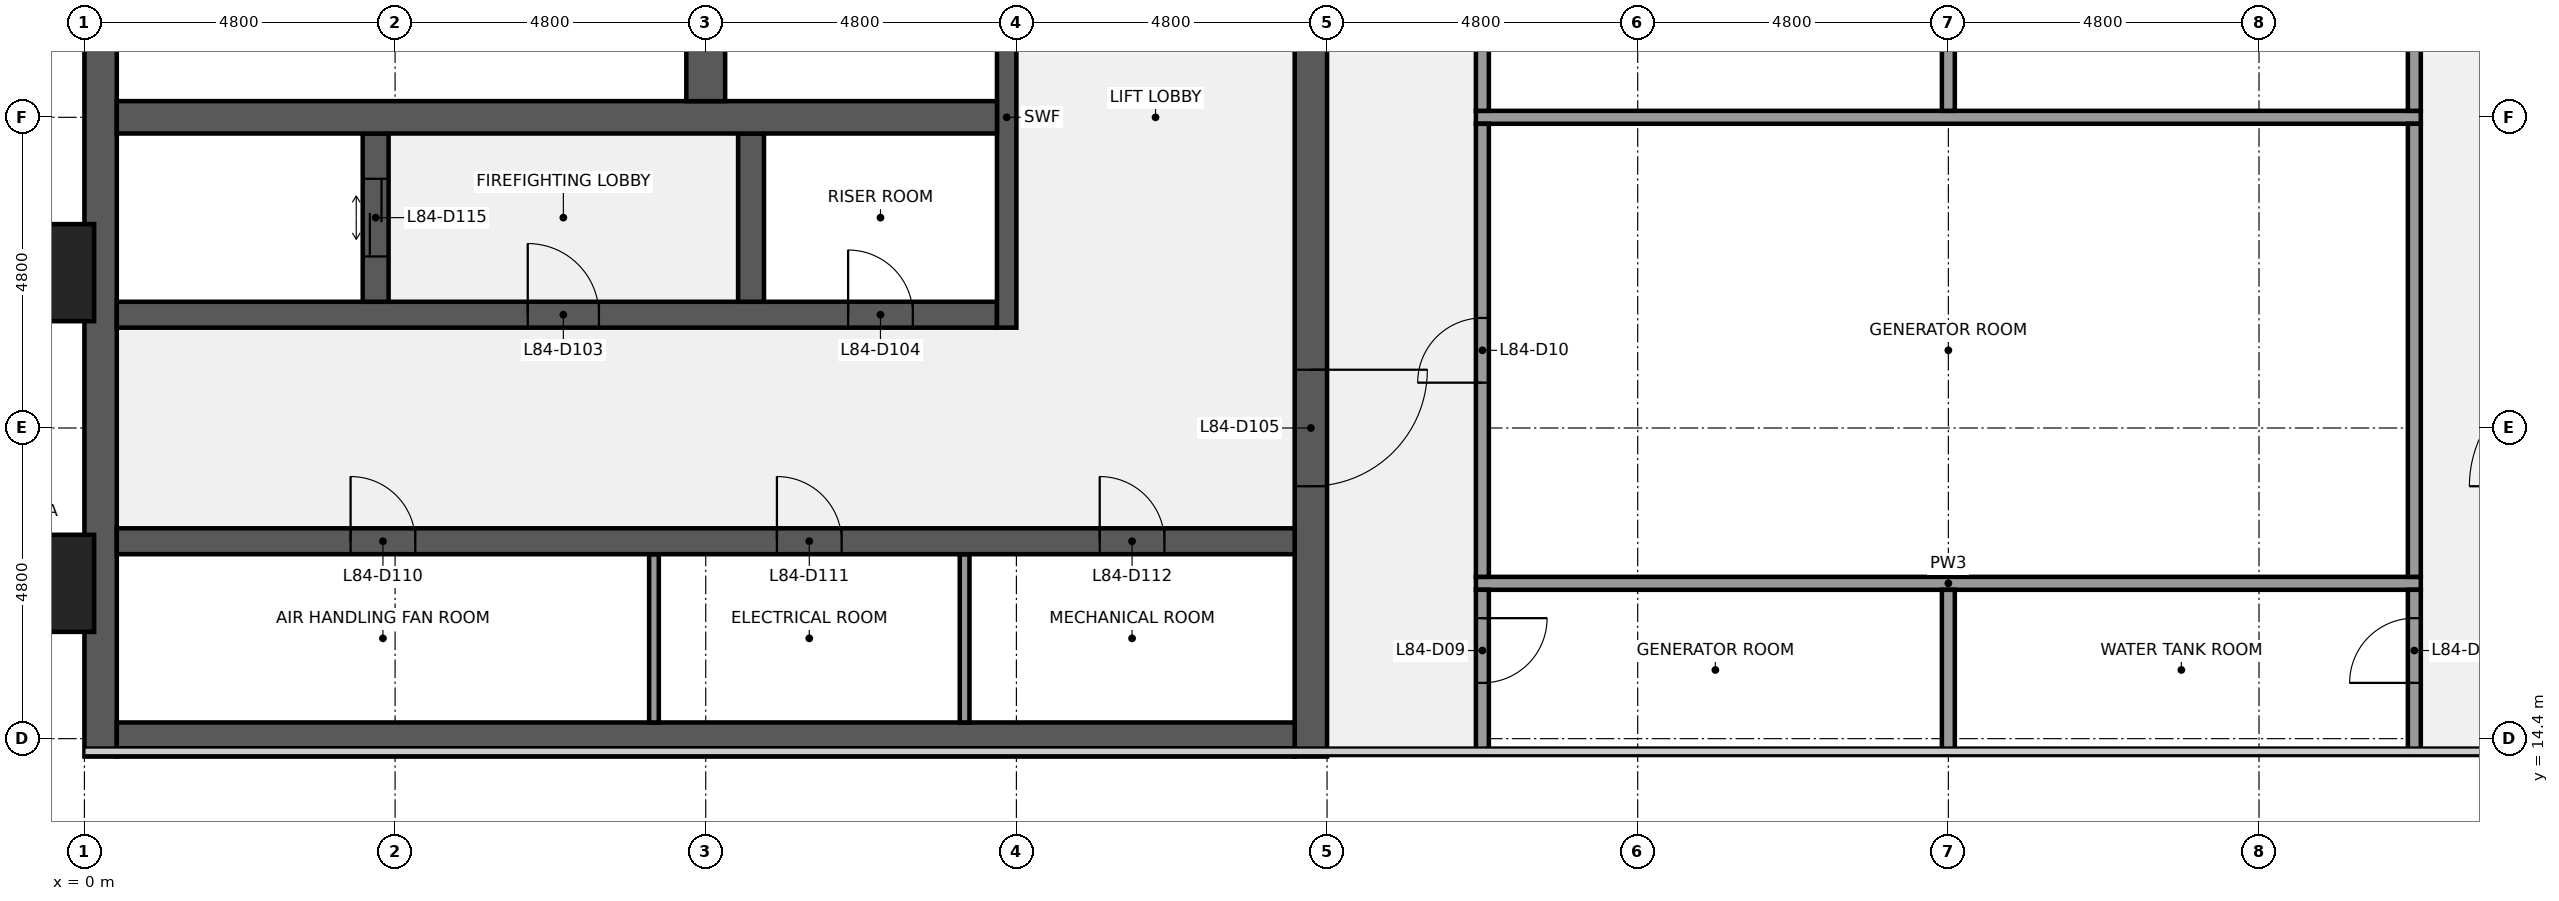
"""IFC4 building model, lengths in metres.
Left out: names, types, materials, properties, quantities, classifications, styles, units other than length and angle.
Written with IfcOpenShell. Run it as: python <this file> out.ifc"""

import sys

from ifc_helpers import new_model, si_unit, direction, frame, frame_2d, origin, origin_2d, place, context, subcontext, project, spatial, polyline, rectangle, outline, extrude, element, fill, save


model = new_model("IFC4")
c1 = context("Model", 3, precision=1e-05, world=origin(), true_north=direction((0.0, 1.0)))
c2 = subcontext(c1, "Body", "Model", "MODEL_VIEW")
j1 = project(units=[si_unit("LENGTHUNIT", "METRE"), si_unit("PLANEANGLEUNIT", "RADIAN")], contexts=[c1])
p1 = place(None, origin())
s1 = spatial("IfcSite", under=j1, at=p1, CompositionType="ELEMENT")
p2 = place(p1, origin())
s2 = spatial("IfcBuilding", under=s1, at=p2, CompositionType="ELEMENT")
p3 = place(p2, frame((0.0, 0.0, 374.3)))
s3 = spatial("IfcBuildingStorey", under=s2, at=p3, CompositionType="ELEMENT", Elevation=374.3)
p4 = place(p3, frame((0.25, 14.124, 0.0), z_axis=(0.0, 0.0, 1.0), x_axis=(0.0, 1.0, 0.0)))
e1 = element("IfcWall", 1, at=p4, inside=s3, PredefinedType="SHEAR", context=c2, shape_type="SweptSolid", body=[
    extrude(outline(polyline([(0.0, 0.0), (24.276, 0.0), (24.277, 27.067), (0.0, 2.488), (0.0, 0.0)])), frame((0.0, 0.25, 0.0), z_axis=(0.0, -1.0, 0.0), x_axis=(1.0, 0.0, 0.0)), (0.0, 0.0, 1.0), 0.5),
])
p5 = place(p3, frame((18.7, 14.187, 0.0), z_axis=(0.0, 0.0, 1.0), x_axis=(-1.0, 0.0, 0.0)))
e2 = element("IfcWall", 2, at=p5, inside=s3, PredefinedType="SHEAR", context=c2, shape_type="SweptSolid", body=[
    extrude(outline(polyline([(0.0, 0.0), (18.2, 0.0), (18.2, 2.552), (0.0, 2.552), (0.0, 0.0)])), frame((0.0, 0.063, 0.0), z_axis=(0.0, -1.0, 0.0), x_axis=(1.0, 0.0, 0.0)), (0.0, 0.0, 1.0), 0.126),
])
p6 = place(p3, frame((18.95, 38.4, 0.0), z_axis=(0.0, 0.0, 1.0), x_axis=(0.0, -1.0, 0.0)))
e3 = element("IfcWall", 3, at=p6, inside=s3, PredefinedType="SHEAR", context=c2, shape_type="SweptSolid", body=[
    extrude(outline(polyline([(0.0, 0.0), (24.276, 0.0), (24.277, 2.488), (0.0, 27.067), (0.0, 0.0)])), frame((0.0, 0.25, 0.0), z_axis=(0.0, -1.0, 0.0), x_axis=(1.0, 0.0, 0.0)), (0.0, 0.0, 1.0), 0.5),
])
p7 = place(p6, frame((18.3, 0.0, 0.0)))
e4 = element("IfcOpeningElement", 4, at=p7, cuts=e3, PredefinedType="OPENING", context=c2, shape_type="SweptSolid", body=[
    extrude(rectangle(XDim=1.8, YDim=2.1, at=frame_2d((0.9, 1.05))), frame((0.0, 0.26, 0.0), z_axis=(0.0, -1.0, 0.0), x_axis=(1.0, 0.0, 0.0)), (0.0, 0.0, 1.0), 0.52),
])
p8 = place(p6, frame((8.7, 0.0, 0.0)))
e5 = element("IfcOpeningElement", 5, at=p8, cuts=e3, PredefinedType="OPENING", context=c2, shape_type="SweptSolid", body=[
    extrude(rectangle(XDim=1.8, YDim=2.1, at=frame_2d((0.9, 1.05))), frame((0.0, 0.26, 0.0), z_axis=(0.0, -1.0, 0.0), x_axis=(1.0, 0.0, 0.0)), (0.0, 0.0, 1.0), 0.52),
])
p9 = place(p3, frame((0.5, 14.45, 0.0), z_axis=(0.0, 0.0, 1.0), x_axis=(1.0, 0.0, 0.0)))
e6 = element("IfcWall", 6, at=p9, inside=s3, PredefinedType="SHEAR", context=c2, shape_type="SweptSolid", body=[
    extrude(outline(polyline([(0.0, 0.0), (18.2, 0.0), (18.2, 2.818), (0.0, 2.818), (0.0, 0.0)])), frame((0.0, 0.2, 0.0), z_axis=(0.0, -1.0, 0.0), x_axis=(1.0, 0.0, 0.0)), (0.0, 0.0, 1.0), 0.4),
])
for number, where, z_axis, x_axis in (
    (7, (8.8, 14.65, 0.0), (0.0, 0.0, 1.0), (0.0, 1.0, 0.0)),
    (8, (13.6, 14.65, 0.0), (0.0, 0.0, 1.0), (0.0, 1.0, 0.0)),
):
    element("IfcWall", number, at=place(p3, frame(where, z_axis=z_axis, x_axis=x_axis)), inside=s3, PredefinedType="PARTITIONING", context=c2, shape_type="SweptSolid", body=[
        extrude(outline(polyline([(0.0, 0.0), (2.6, 0.0), (2.6, 5.653), (0.0, 3.021), (0.0, 0.0)])), frame((0.0, 0.075, 0.0), z_axis=(0.0, -1.0, 0.0), x_axis=(1.0, 0.0, 0.0)), (0.0, 0.0, 1.0), 0.15),
    ])
p10 = place(p3, frame((0.5, 17.45, 0.0), z_axis=(0.0, 0.0, 1.0), x_axis=(1.0, 0.0, 0.0)))
e9 = element("IfcWall", 9, at=p10, inside=s3, PredefinedType="SHEAR", context=c2, shape_type="SweptSolid", body=[
    extrude(outline(polyline([(0.0, 0.0), (18.2, 0.0), (18.2, 5.855), (0.0, 5.855), (0.0, 0.0)])), frame((0.0, 0.2, 0.0), z_axis=(0.0, -1.0, 0.0), x_axis=(1.0, 0.0, 0.0)), (0.0, 0.0, 1.0), 0.4),
])
p11 = place(p10, frame((3.613, 0.0, 0.0)))
e10 = element("IfcOpeningElement", 10, at=p11, cuts=e9, PredefinedType="OPENING", context=c2, shape_type="SweptSolid", body=[
    extrude(rectangle(XDim=1.0, YDim=2.1, at=frame_2d((0.5, 1.05))), frame((0.0, 0.21, 0.0), z_axis=(0.0, -1.0, 0.0), x_axis=(1.0, 0.0, 0.0)), (0.0, 0.0, 1.0), 0.42),
])
p12 = place(p10, frame((10.2, 0.0, 0.0)))
e11 = element("IfcOpeningElement", 11, at=p12, cuts=e9, PredefinedType="OPENING", context=c2, shape_type="SweptSolid", body=[
    extrude(rectangle(XDim=1.0, YDim=2.1, at=frame_2d((0.5, 1.05))), frame((0.0, 0.21, 0.0), z_axis=(0.0, -1.0, 0.0), x_axis=(1.0, 0.0, 0.0)), (0.0, 0.0, 1.0), 0.42),
])
p13 = place(p10, frame((15.188, 0.0, 0.0)))
e12 = element("IfcOpeningElement", 12, at=p13, cuts=e9, PredefinedType="OPENING", context=c2, shape_type="SweptSolid", body=[
    extrude(rectangle(XDim=1.0, YDim=2.1, at=frame_2d((0.5, 1.05))), frame((0.0, 0.21, 0.0), z_axis=(0.0, -1.0, 0.0), x_axis=(1.0, 0.0, 0.0)), (0.0, 0.0, 1.0), 0.42),
])
p14 = place(p3, frame((0.5, 20.95, 0.0), z_axis=(0.0, 0.0, 1.0), x_axis=(1.0, 0.0, 0.0)))
e13 = element("IfcWall", 13, at=p14, inside=s3, PredefinedType="SHEAR", context=c2, shape_type="SweptSolid", body=[
    extrude(outline(polyline([(0.0, 0.0), (13.6, 0.0), (13.6, 9.399), (0.0, 9.399), (0.0, 0.0)])), frame((0.0, 0.2, 0.0), z_axis=(0.0, -1.0, 0.0), x_axis=(1.0, 0.0, 0.0)), (0.0, 0.0, 1.0), 0.4),
])
p15 = place(p14, frame((6.35, 0.0, 0.0)))
e14 = element("IfcOpeningElement", 14, at=p15, cuts=e13, PredefinedType="OPENING", context=c2, shape_type="SweptSolid", body=[
    extrude(rectangle(XDim=1.1, YDim=2.1, at=frame_2d((0.55, 1.05))), frame((0.0, 0.21, 0.0), z_axis=(0.0, -1.0, 0.0), x_axis=(1.0, 0.0, 0.0)), (0.0, 0.0, 1.0), 0.42),
])
p16 = place(p14, frame((11.3, 0.0, 0.0)))
e15 = element("IfcOpeningElement", 15, at=p16, cuts=e13, PredefinedType="OPENING", context=c2, shape_type="SweptSolid", body=[
    extrude(rectangle(XDim=1.0, YDim=2.1, at=frame_2d((0.5, 1.05))), frame((0.0, 0.21, 0.0), z_axis=(0.0, -1.0, 0.0), x_axis=(1.0, 0.0, 0.0)), (0.0, 0.0, 1.0), 0.42),
])
p17 = place(p3, frame((14.25, 20.75, 0.0), z_axis=(0.0, 0.0, 1.0), x_axis=(0.0, 1.0, 0.0)))
e16 = element("IfcWall", 16, at=p17, inside=s3, PredefinedType="SHEAR", context=c2, shape_type="SweptSolid", body=[
    extrude(outline(polyline([(0.0, 0.0), (6.5, 0.0), (6.5, 15.778), (0.0, 9.197), (0.0, 0.0)])), frame((0.0, 0.15, 0.0), z_axis=(0.0, -1.0, 0.0), x_axis=(1.0, 0.0, 0.0)), (0.0, 0.0, 1.0), 0.3),
])
p18 = place(p3, frame((4.5, 21.15, 0.0), z_axis=(0.0, 0.0, 1.0), x_axis=(0.0, 1.0, 0.0)))
e17 = element("IfcWall", 17, at=p18, inside=s3, PredefinedType="SHEAR", context=c2, shape_type="SweptSolid", body=[
    extrude(outline(polyline([(0.0, 0.0), (2.6, 0.0), (2.6, 12.234), (0.0, 9.602), (0.0, 0.0)])), frame((0.0, 0.2, 0.0), z_axis=(0.0, -1.0, 0.0), x_axis=(1.0, 0.0, 0.0)), (0.0, 0.0, 1.0), 0.4),
])
p19 = place(p18, frame((0.7, 0.0, 0.0)))
e18 = element("IfcOpeningElement", 18, at=p19, cuts=e17, PredefinedType="OPENING", context=c2, shape_type="SweptSolid", body=[
    extrude(rectangle(XDim=1.2, YDim=2.1, at=frame_2d((0.6, 1.05))), frame((0.0, 0.21, 0.0), z_axis=(0.0, -1.0, 0.0), x_axis=(1.0, 0.0, 0.0)), (0.0, 0.0, 1.0), 0.42),
])
p20 = place(p3, frame((10.3, 21.15, 0.0), z_axis=(0.0, 0.0, 1.0), x_axis=(0.0, 1.0, 0.0)))
e19 = element("IfcWall", 19, at=p20, inside=s3, PredefinedType="SHEAR", context=c2, shape_type="SweptSolid", body=[
    extrude(outline(polyline([(0.0, 0.0), (2.6, 0.0), (2.6, 12.234), (0.0, 9.602), (0.0, 0.0)])), frame((0.0, 0.2, 0.0), z_axis=(0.0, -1.0, 0.0), x_axis=(1.0, 0.0, 0.0)), (0.0, 0.0, 1.0), 0.4),
])
p21 = place(p3, frame((0.5, 24.0, 0.0), z_axis=(0.0, 0.0, 1.0), x_axis=(1.0, 0.0, 0.0)))
e20 = element("IfcWall", 20, at=p21, inside=s3, PredefinedType="SHEAR", context=c2, shape_type="SweptSolid", body=[
    extrude(outline(polyline([(0.0, 0.0), (13.6, 0.0), (13.6, 12.488), (0.0, 12.488), (0.0, 0.0)])), frame((0.0, 0.25, 0.0), z_axis=(0.0, -1.0, 0.0), x_axis=(1.0, 0.0, 0.0)), (0.0, 0.0, 1.0), 0.5),
])
p22 = place(p3, frame((9.6, 24.25, 0.0), z_axis=(0.0, 0.0, 1.0), x_axis=(0.0, 1.0, 0.0)))
e21 = element("IfcWall", 21, at=p22, inside=s3, PredefinedType="SHEAR", context=c2, shape_type="SweptSolid", body=[
    extrude(outline(polyline([(0.0, 0.0), (2.6, 0.0), (2.6, 15.373), (0.0, 12.74), (0.0, 0.0)])), frame((0.0, 0.3, 0.0), z_axis=(0.0, -1.0, 0.0), x_axis=(1.0, 0.0, 0.0)), (0.0, 0.0, 1.0), 0.6),
])
for number, where, z_axis, x_axis in (
    (22, (21.5, 16.8, 0.0), (0.0, 0.0, 1.0), (1.0, 0.0, 0.0)),
    (23, (21.5, 24.0, 0.0), (0.0, 0.0, 1.0), (1.0, 0.0, 0.0)),
):
    element("IfcWall", number, at=place(p3, frame(where, z_axis=z_axis, x_axis=x_axis)), inside=s3, PredefinedType="PARTITIONING", context=c2, shape_type="SweptSolid", body=[
        extrude(rectangle(XDim=14.6, YDim=0.2, at=frame_2d((7.3, 0.0))), origin(), (0.0, 0.0, 1.0), 2.9),
    ])
p23 = place(p3, frame((21.6, 14.223, 0.0), z_axis=(0.0, 0.0, 1.0), x_axis=(0.0, 1.0, 0.0)))
e24 = element("IfcWall", 24, at=p23, inside=s3, PredefinedType="PARTITIONING", context=c2, shape_type="SweptSolid", body=[
    extrude(rectangle(XDim=2.477, YDim=0.2, at=frame_2d((1.238, 0.0))), origin(), (0.0, 0.0, 1.0), 2.9),
])
p24 = place(p23, frame((1.038, 0.0, 0.0)))
e25 = element("IfcOpeningElement", 25, at=p24, cuts=e24, PredefinedType="OPENING", context=c2, shape_type="SweptSolid", body=[
    extrude(rectangle(XDim=1.0, YDim=2.1, at=frame_2d((0.5, 1.05))), frame((0.0, 0.11, 0.0), z_axis=(0.0, -1.0, 0.0), x_axis=(1.0, 0.0, 0.0)), (0.0, 0.0, 1.0), 0.22),
])
p25 = place(p3, frame((21.6, 16.9, 0.0), z_axis=(0.0, 0.0, 1.0), x_axis=(0.0, 1.0, 0.0)))
e26 = element("IfcWall", 26, at=p25, inside=s3, PredefinedType="PARTITIONING", context=c2, shape_type="SweptSolid", body=[
    extrude(rectangle(XDim=7.0, YDim=0.2, at=frame_2d((3.5, 0.0))), origin(), (0.0, 0.0, 1.0), 2.9),
])
p26 = place(p25, frame((3.0, 0.0, 0.0)))
e27 = element("IfcOpeningElement", 27, at=p26, cuts=e26, PredefinedType="OPENING", context=c2, shape_type="SweptSolid", body=[
    extrude(rectangle(XDim=1.0, YDim=2.1, at=frame_2d((0.5, 1.05))), frame((0.0, 0.11, 0.0), z_axis=(0.0, -1.0, 0.0), x_axis=(1.0, 0.0, 0.0)), (0.0, 0.0, 1.0), 0.22),
])
p27 = place(p3, frame((21.6, 24.1, 0.0), z_axis=(0.0, 0.0, 1.0), x_axis=(0.0, 1.0, 0.0)))
e28 = element("IfcWall", 28, at=p27, inside=s3, PredefinedType="PARTITIONING", context=c2, shape_type="SweptSolid", body=[
    extrude(rectangle(XDim=7.0, YDim=0.2, at=frame_2d((3.5, 0.0))), origin(), (0.0, 0.0, 1.0), 2.9),
])
p28 = place(p27, frame((3.0, 0.0, 0.0)))
e29 = element("IfcOpeningElement", 29, at=p28, cuts=e28, PredefinedType="OPENING", context=c2, shape_type="SweptSolid", body=[
    extrude(rectangle(XDim=1.0, YDim=2.1, at=frame_2d((0.5, 1.05))), frame((0.0, 0.11, 0.0), z_axis=(0.0, -1.0, 0.0), x_axis=(1.0, 0.0, 0.0)), (0.0, 0.0, 1.0), 0.22),
])
p29 = place(p3, frame((28.8, 14.223, 0.0), z_axis=(0.0, 0.0, 1.0), x_axis=(0.0, 1.0, 0.0)))
e30 = element("IfcWall", 30, at=p29, inside=s3, PredefinedType="PARTITIONING", context=c2, shape_type="SweptSolid", body=[
    extrude(rectangle(XDim=2.477, YDim=0.2, at=frame_2d((1.238, 0.0))), origin(), (0.0, 0.0, 1.0), 2.9),
])
p30 = place(p3, frame((28.8, 24.1, 0.0), z_axis=(0.0, 0.0, 1.0), x_axis=(0.0, 1.0, 0.0)))
e31 = element("IfcWall", 31, at=p30, inside=s3, PredefinedType="PARTITIONING", context=c2, shape_type="SweptSolid", body=[
    extrude(rectangle(XDim=7.0, YDim=0.2, at=frame_2d((3.5, 0.0))), origin(), (0.0, 0.0, 1.0), 2.9),
])
p31 = place(p3, frame((36.0, 14.223, 0.0), z_axis=(0.0, 0.0, 1.0), x_axis=(0.0, 1.0, 0.0)))
e32 = element("IfcWall", 32, at=p31, inside=s3, PredefinedType="PARTITIONING", context=c2, shape_type="SweptSolid", body=[
    extrude(rectangle(XDim=2.477, YDim=0.2, at=frame_2d((1.238, 0.0))), origin(), (0.0, 0.0, 1.0), 2.9),
])
p32 = place(p31, frame((1.038, 0.0, 0.0)))
e33 = element("IfcOpeningElement", 33, at=p32, cuts=e32, PredefinedType="OPENING", context=c2, shape_type="SweptSolid", body=[
    extrude(rectangle(XDim=1.0, YDim=2.1, at=frame_2d((0.5, 1.05))), frame((0.0, 0.11, 0.0), z_axis=(0.0, -1.0, 0.0), x_axis=(1.0, 0.0, 0.0)), (0.0, 0.0, 1.0), 0.22),
])
p33 = place(p3, frame((36.0, 16.9, 0.0), z_axis=(0.0, 0.0, 1.0), x_axis=(0.0, 1.0, 0.0)))
e34 = element("IfcWall", 34, at=p33, inside=s3, PredefinedType="PARTITIONING", context=c2, shape_type="SweptSolid", body=[
    extrude(rectangle(XDim=7.0, YDim=0.2, at=frame_2d((3.5, 0.0))), origin(), (0.0, 0.0, 1.0), 2.9),
])
p34 = place(p3, frame((36.0, 24.1, 0.0), z_axis=(0.0, 0.0, 1.0), x_axis=(0.0, 1.0, 0.0)))
e35 = element("IfcWall", 35, at=p34, inside=s3, PredefinedType="PARTITIONING", context=c2, shape_type="SweptSolid", body=[
    extrude(rectangle(XDim=7.0, YDim=0.2, at=frame_2d((3.5, 0.0))), origin(), (0.0, 0.0, 1.0), 2.9),
])
p35 = place(p34, frame((3.0, 0.0, 0.0)))
e36 = element("IfcOpeningElement", 36, at=p35, cuts=e35, PredefinedType="OPENING", context=c2, shape_type="SweptSolid", body=[
    extrude(rectangle(XDim=1.0, YDim=2.1, at=frame_2d((0.5, 1.05))), frame((0.0, 0.11, 0.0), z_axis=(0.0, -1.0, 0.0), x_axis=(1.0, 0.0, 0.0)), (0.0, 0.0, 1.0), 0.22),
])
for number, where, z_axis, x_axis in (
    (37, (-0.75, 16.8, 0.0), (0.0, 0.0, 1.0), (0.0, 1.0, 0.0)),
    (38, (-0.75, 21.6, 0.0), (0.0, 0.0, 1.0), (0.0, 1.0, 0.0)),
):
    element("IfcColumn", number, at=place(p3, frame(where, z_axis=z_axis, x_axis=x_axis)), inside=s3, PredefinedType="PILASTER", context=c2, shape_type="SweptSolid", body=[
        extrude(rectangle(XDim=1.8, YDim=1.5, at=origin_2d()), origin(), (0.0, 0.0, 1.0), 4.0),
    ])
p36 = place(p15, origin())
e39 = element("IfcDoor", 39, at=p36, inside=s3, OperationType="SINGLE_SWING_LEFT", PredefinedType="DOOR", context=c2, shape_type="SweptSolid", body=[
    extrude(rectangle(XDim=1.1, YDim=2.1, at=frame_2d((0.55, 1.05))), frame((0.0, 0.025, 0.0), z_axis=(0.0, -1.0, 0.0), x_axis=(1.0, 0.0, 0.0)), (0.0, 0.0, 1.0), 0.05),
])
fill(e14, e39)
p37 = place(p16, origin())
e40 = element("IfcDoor", 40, at=p37, inside=s3, OperationType="SINGLE_SWING_LEFT", PredefinedType="DOOR", context=c2, shape_type="SweptSolid", body=[
    extrude(rectangle(XDim=1.0, YDim=2.1, at=frame_2d((0.5, 1.05))), frame((0.0, 0.025, 0.0), z_axis=(0.0, -1.0, 0.0), x_axis=(1.0, 0.0, 0.0)), (0.0, 0.0, 1.0), 0.05),
])
fill(e15, e40)
p38 = place(p7, origin())
e41 = element("IfcDoor", 41, at=p38, inside=s3, OperationType="DOUBLE_DOOR_SINGLE_SWING", PredefinedType="DOOR", context=c2, shape_type="SweptSolid", body=[
    extrude(rectangle(XDim=1.8, YDim=2.1, at=frame_2d((0.9, 1.05))), frame((0.0, 0.025, 0.0), z_axis=(0.0, -1.0, 0.0), x_axis=(1.0, 0.0, 0.0)), (0.0, 0.0, 1.0), 0.05),
])
fill(e4, e41)
p39 = place(p11, origin())
e42 = element("IfcDoor", 42, at=p39, inside=s3, OperationType="SINGLE_SWING_LEFT", PredefinedType="DOOR", context=c2, shape_type="SweptSolid", body=[
    extrude(rectangle(XDim=1.0, YDim=2.1, at=frame_2d((0.5, 1.05))), frame((0.0, 0.025, 0.0), z_axis=(0.0, -1.0, 0.0), x_axis=(1.0, 0.0, 0.0)), (0.0, 0.0, 1.0), 0.05),
])
fill(e10, e42)
p40 = place(p12, origin())
e43 = element("IfcDoor", 43, at=p40, inside=s3, OperationType="SINGLE_SWING_LEFT", PredefinedType="DOOR", context=c2, shape_type="SweptSolid", body=[
    extrude(rectangle(XDim=1.0, YDim=2.1, at=frame_2d((0.5, 1.05))), frame((0.0, 0.025, 0.0), z_axis=(0.0, -1.0, 0.0), x_axis=(1.0, 0.0, 0.0)), (0.0, 0.0, 1.0), 0.05),
])
fill(e11, e43)
p41 = place(p13, origin())
e44 = element("IfcDoor", 44, at=p41, inside=s3, OperationType="SINGLE_SWING_LEFT", PredefinedType="DOOR", context=c2, shape_type="SweptSolid", body=[
    extrude(rectangle(XDim=1.0, YDim=2.1, at=frame_2d((0.5, 1.05))), frame((0.0, 0.025, 0.0), z_axis=(0.0, -1.0, 0.0), x_axis=(1.0, 0.0, 0.0)), (0.0, 0.0, 1.0), 0.05),
])
fill(e12, e44)
p42 = place(p19, origin())
e45 = element("IfcDoor", 45, at=p42, inside=s3, OperationType="DOUBLE_DOOR_SLIDING", PredefinedType="DOOR", context=c2, shape_type="SweptSolid", body=[
    extrude(rectangle(XDim=1.2, YDim=2.1, at=frame_2d((0.6, 1.05))), frame((0.0, 0.025, 0.0), z_axis=(0.0, -1.0, 0.0), x_axis=(1.0, 0.0, 0.0)), (0.0, 0.0, 1.0), 0.05),
])
fill(e18, e45)
p43 = place(p24, origin())
e46 = element("IfcDoor", 46, at=p43, inside=s3, OperationType="SINGLE_SWING_RIGHT", PredefinedType="DOOR", context=c2, shape_type="SweptSolid", body=[
    extrude(rectangle(XDim=1.0, YDim=2.1, at=frame_2d((0.5, 1.05))), frame((0.0, 0.025, 0.0), z_axis=(0.0, -1.0, 0.0), x_axis=(1.0, 0.0, 0.0)), (0.0, 0.0, 1.0), 0.05),
])
fill(e25, e46)
p44 = place(p26, origin())
e47 = element("IfcDoor", 47, at=p44, inside=s3, OperationType="SINGLE_SWING_LEFT", PredefinedType="DOOR", context=c2, shape_type="SweptSolid", body=[
    extrude(rectangle(XDim=1.0, YDim=2.1, at=frame_2d((0.5, 1.05))), frame((0.0, 0.025, 0.0), z_axis=(0.0, -1.0, 0.0), x_axis=(1.0, 0.0, 0.0)), (0.0, 0.0, 1.0), 0.05),
])
fill(e27, e47)
p45 = place(p32, origin())
e48 = element("IfcDoor", 48, at=p45, inside=s3, OperationType="SINGLE_SWING_LEFT", PredefinedType="DOOR", context=c2, shape_type="SweptSolid", body=[
    extrude(rectangle(XDim=1.0, YDim=2.1, at=frame_2d((0.5, 1.05))), frame((0.0, 0.025, 0.0), z_axis=(0.0, -1.0, 0.0), x_axis=(1.0, 0.0, 0.0)), (0.0, 0.0, 1.0), 0.05),
])
fill(e33, e48)
save(model, sys.argv[1])
